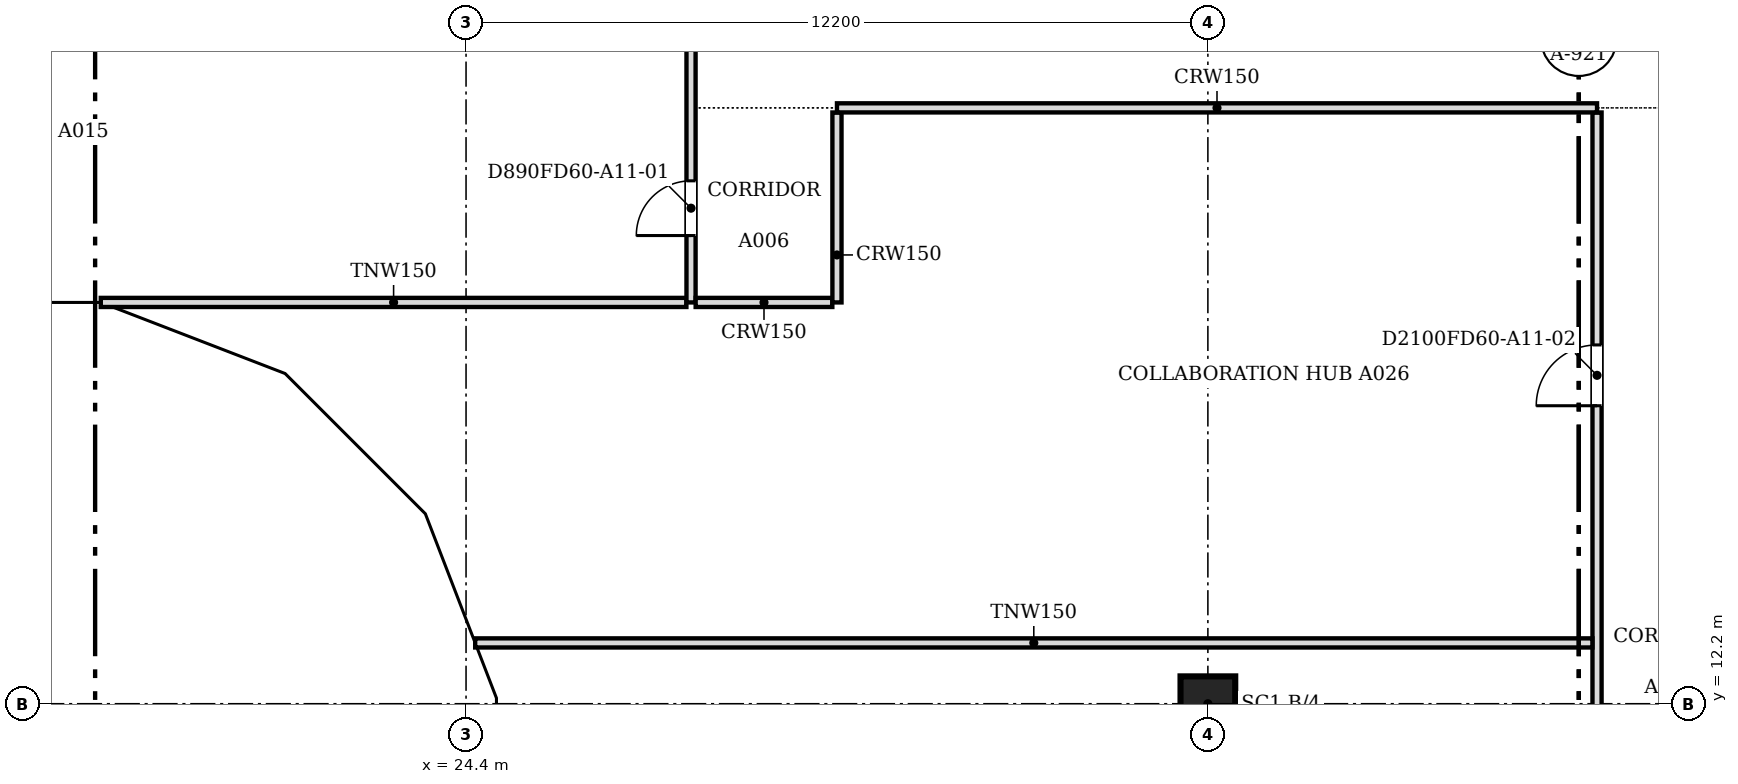
"""IFC4 building model, lengths in metres.
Left out: names, types, materials, properties, quantities, classifications, styles, units other than length and angle.
Written with IfcOpenShell. Run it as: python <this file> out.ifc"""

import sys

from ifc_helpers import new_model, si_unit, direction, frame, frame_2d, origin, origin_2d, place, context, subcontext, project, spatial, polyline, rectangle, outline, extrude, faceted_brep, source, transform, mapped, element, fill, save


model = new_model("IFC4")
c1 = context("Model", 3, precision=1e-05, world=origin(), true_north=direction((0.0, 1.0)))
c2 = subcontext(c1, "Body", "Model", "MODEL_VIEW")
j1 = project(units=[si_unit("LENGTHUNIT", "METRE"), si_unit("PLANEANGLEUNIT", "RADIAN")], contexts=[c1])
p1 = place(None, origin())
s1 = spatial("IfcSite", under=j1, at=p1, CompositionType="ELEMENT")
p2 = place(p1, origin())
s2 = spatial("IfcBuilding", under=s1, at=p2, CompositionType="ELEMENT")
p3 = place(p2, frame((0.0, 0.0, 124.0)))
s3 = spatial("IfcBuildingStorey", under=s2, at=p3, CompositionType="ELEMENT", Elevation=124.0)
p4 = place(p3, frame((36.6, 12.2, 0.0), z_axis=(0.0, 0.0, 1.0), x_axis=(1.0, 0.0, 0.0)))
e1 = element("IfcColumn", 1, at=p4, inside=s3, PredefinedType="COLUMN", context=c2, shape_type="SweptSolid", body=[
    extrude(rectangle(XDim=0.9, YDim=0.9, at=origin_2d()), origin(), (0.0, 0.0, 1.0), 3.6),
])
m1 = source(origin(), c2, "Body", "Brep", [
    faceted_brep([(3.05, -0.25, 0.0), (6.1, -0.25, 3.743), (6.1, -0.25, 3.857), (3.05, -0.25, 7.6), (0.0, -0.25, 3.8), (0.0, 0.25, 3.8), (3.05, 0.25, 7.6), (6.146, 0.25, 3.8), (3.05, 0.25, 0.0), (6.146, -0.0, 3.8)], [[[0, 1, 2, 3, 4]], [[5, 6, 7, 8]], [[8, 7, 9, 1, 0]], [[7, 6, 3, 2, 9]], [[6, 5, 4, 3]], [[5, 8, 0, 4]], [[1, 9, 2]]]),
])
p5 = place(p3, frame((12.2, 18.55, -3.8), z_axis=(0.0, 0.0, 1.0), x_axis=(1.0, 0.0, 0.0)))
e2 = element("IfcWall", 2, at=p5, inside=s3, PredefinedType="SOLIDWALL", context=c2, shape_type="MappedRepresentation", body=[
    mapped(m1, transform((0.0, 0.0, 0.0), scale=1.0)),
])
m2 = source(origin(), c2, "Body", "SweptSolid", [
    extrude(outline(polyline([(3.052, 0.398), (5.824, 3.8), (3.052, 7.202), (0.321, 3.8), (3.052, 0.398)])), frame((0.0, 0.26, 0.0), z_axis=(0.0, -1.0, 0.0), x_axis=(1.0, 0.0, 0.0)), (0.0, 0.0, 1.0), 0.52),
])
p6 = place(p5, origin())
e3 = element("IfcOpeningElement", 3, at=p6, cuts=e2, PredefinedType="OPENING", context=c2, shape_type="MappedRepresentation", body=[
    mapped(m2, transform((0.0, 0.0, 0.0), scale=1.0)),
])
m3 = source(origin(), c2, "Body", "Brep", [
    faceted_brep([(3.096, -0.25, 7.536), (0.047, -0.25, 3.856), (0.047, -0.25, 3.744), (3.096, -0.25, 0.064), (0.0, 0.25, 3.8), (3.149, 0.25, 7.6), (3.202, 0.25, 7.536), (3.202, 0.25, 0.064), (3.149, 0.25, 0.0), (3.149, -0.0, 0.0), (3.149, -0.0, 7.6), (0.0, 0.0, 3.8)], [[[0, 1, 2, 3]], [[4, 5, 6, 7, 8]], [[8, 7, 9]], [[6, 5, 10]], [[5, 4, 11, 1, 0, 10]], [[4, 8, 9, 3, 2, 11]], [[11, 2, 1]], [[3, 9, 7, 6, 10, 0]]]),
])
p7 = place(p3, frame((18.346, 18.55, -3.8), z_axis=(0.0, 0.0, 1.0), x_axis=(0.932985567668, -0.359913782069, 0.0)))
e4 = element("IfcWall", 4, at=p7, inside=s3, PredefinedType="SOLIDWALL", context=c2, shape_type="MappedRepresentation", body=[
    mapped(m3, transform((0.0, 0.0, 0.0), scale=1.0)),
])
m4 = source(origin(), c2, "Body", "SweptSolid", [
    extrude(outline(polyline([(2.949, 6.967), (0.325, 3.8), (2.949, 0.633), (2.949, 6.967)])), frame((0.0, 0.26, 0.0), z_axis=(0.0, -1.0, 0.0), x_axis=(1.0, 0.0, 0.0)), (0.0, 0.0, 1.0), 0.52),
])
p8 = place(p7, origin())
e5 = element("IfcOpeningElement", 5, at=p8, cuts=e4, PredefinedType="OPENING", context=c2, shape_type="MappedRepresentation", body=[
    mapped(m4, transform((0.0, 0.0, 0.0), scale=1.0)),
])
m5 = source(origin(), c2, "Body", "Brep", [
    faceted_brep([(0.106, -0.25, 0.064), (3.156, -0.25, 3.736), (3.156, -0.25, 3.864), (0.106, -0.25, 7.536), (0.0, 0.25, 7.536), (0.053, 0.25, 7.6), (3.209, 0.25, 3.8), (0.053, 0.25, 0.0), (0.0, 0.25, 0.064), (3.209, -0.0, 3.8), (0.053, 0.0, 0.0), (0.053, 0.0, 7.6)], [[[0, 1, 2, 3]], [[4, 5, 6, 7, 8]], [[7, 6, 9, 1, 0, 10]], [[6, 5, 11, 3, 2, 9]], [[5, 4, 11]], [[8, 7, 10]], [[8, 10, 0, 3, 11, 4]], [[1, 9, 2]]]),
])
p9 = place(p3, frame((21.248, 17.454, -3.8), z_axis=(0.0, 0.0, 1.0), x_axis=(0.707106781187, -0.707106781187, 0.0)))
e6 = element("IfcWall", 6, at=p9, inside=s3, PredefinedType="SOLIDWALL", context=c2, shape_type="MappedRepresentation", body=[
    mapped(m5, transform((0.0, 0.0, 0.0), scale=1.0)),
])
m6 = source(origin(), c2, "Body", "SweptSolid", [
    extrude(outline(polyline([(0.253, 0.632), (2.884, 3.8), (0.253, 6.968), (0.253, 0.632)])), frame((0.0, 0.26, 0.0), z_axis=(0.0, -1.0, 0.0), x_axis=(1.0, 0.0, 0.0)), (0.0, 0.0, 1.0), 0.52),
])
p10 = place(p9, origin())
e7 = element("IfcOpeningElement", 7, at=p10, cuts=e6, PredefinedType="OPENING", context=c2, shape_type="MappedRepresentation", body=[
    mapped(m6, transform((0.0, 0.0, 0.0), scale=1.0)),
])
m7 = source(origin(), c2, "Body", "Brep", [
    faceted_brep([(3.103, -0.25, 7.544), (0.053, -0.25, 3.864), (0.053, -0.25, 3.736), (3.103, -0.25, 0.056), (0.0, 0.25, 3.8), (3.149, 0.25, 7.6), (3.196, 0.25, 7.543), (3.196, 0.25, 0.057), (3.149, 0.25, 0.0), (3.149, -0.0, 0.0), (3.149, -0.0, 7.6), (0.0, 0.0, 3.8)], [[[0, 1, 2, 3]], [[4, 5, 6, 7, 8]], [[8, 7, 9]], [[6, 5, 10]], [[5, 4, 11, 1, 0, 10]], [[4, 8, 9, 3, 2, 11]], [[11, 2, 1]], [[3, 9, 7, 6, 10, 0]]]),
])
p11 = place(p3, frame((23.517, 15.185, -3.8), z_axis=(0.0, 0.0, 1.0), x_axis=(0.359864468756, -0.933004589553, 0.0)))
e8 = element("IfcWall", 8, at=p11, inside=s3, PredefinedType="SOLIDWALL", context=c2, shape_type="MappedRepresentation", body=[
    mapped(m7, transform((0.0, 0.0, 0.0), scale=1.0)),
])
p12 = place(p11, origin())
e9 = element("IfcOpeningElement", 9, at=p12, cuts=e8, PredefinedType="OPENING", context=c2, shape_type="MappedRepresentation", body=[
    mapped(m4, transform((0.0, 0.0, 0.0), scale=1.0)),
])
m8 = source(origin(), c2, "Body", "Brep", [
    faceted_brep([(0.093, -0.25, 0.057), (3.143, -0.25, 3.8), (0.093, -0.25, 7.543), (0.0, 0.25, 7.544), (0.047, 0.25, 7.6), (3.143, 0.25, 3.8), (0.047, 0.25, 0.0), (0.0, 0.25, 0.056), (0.047, 0.0, 0.0), (0.047, 0.0, 7.6)], [[[0, 1, 2]], [[3, 4, 5, 6, 7]], [[6, 5, 1, 0, 8]], [[5, 4, 9, 2, 1]], [[4, 3, 9]], [[7, 6, 8]], [[7, 8, 0, 2, 9, 3]]]),
])
p13 = place(p3, frame((24.65, 12.293, -3.8), z_axis=(0.0, 0.0, 1.0), x_axis=(0.0, -1.0, 0.0)))
e10 = element("IfcWall", 10, at=p13, inside=s3, PredefinedType="SOLIDWALL", context=c2, shape_type="MappedRepresentation", body=[
    mapped(m8, transform((0.0, 0.0, 0.0), scale=1.0)),
])
m9 = source(origin(), c2, "Body", "SweptSolid", [
    extrude(outline(polyline([(0.247, 0.641), (2.821, 3.8), (0.247, 6.959), (0.247, 0.641)])), frame((0.0, 0.26, 0.0), z_axis=(0.0, -1.0, 0.0), x_axis=(1.0, 0.0, 0.0)), (0.0, 0.0, 1.0), 0.52),
])
p14 = place(p13, origin())
e11 = element("IfcOpeningElement", 11, at=p14, cuts=e10, PredefinedType="OPENING", context=c2, shape_type="MappedRepresentation", body=[
    mapped(m9, transform((0.0, 0.0, 0.0), scale=1.0)),
])
p15 = place(p2, frame((0.0, 0.0, 127.8)))
s4 = spatial("IfcBuildingStorey", under=s2, at=p15, CompositionType="ELEMENT", Elevation=127.8)
m10 = source(origin(), c2, "Body", "Brep", [
    faceted_brep([(3.05, -0.25, 7.543), (0.0, -0.25, 3.8), (3.05, -0.25, 0.057), (0.0, 0.25, 3.8), (3.096, 0.25, 7.6), (3.143, 0.25, 7.544), (3.143, 0.25, 0.056), (3.096, 0.25, 0.0), (3.096, -0.0, 0.0), (3.096, -0.0, 7.6)], [[[0, 1, 2]], [[3, 4, 5, 6, 7]], [[7, 6, 8]], [[5, 4, 9]], [[4, 3, 1, 0, 9]], [[3, 7, 8, 2, 1]], [[2, 8, 6, 5, 9, 0]]]),
])
p16 = place(p15, frame((15.25, 18.55, -3.8), z_axis=(0.0, 0.0, 1.0), x_axis=(1.0, 0.0, 0.0)))
e12 = element("IfcWall", 12, at=p16, inside=s4, PredefinedType="SOLIDWALL", context=c2, shape_type="MappedRepresentation", body=[
    mapped(m10, transform((0.0, 0.0, 0.0), scale=1.0)),
])
m11 = source(origin(), c2, "Body", "SweptSolid", [
    extrude(outline(polyline([(2.896, 6.959), (0.323, 3.8), (2.896, 0.641), (2.896, 6.959)])), frame((0.0, 0.26, 0.0), z_axis=(0.0, -1.0, 0.0), x_axis=(1.0, 0.0, 0.0)), (0.0, 0.0, 1.0), 0.52),
])
p17 = place(p16, origin())
e13 = element("IfcOpeningElement", 13, at=p17, cuts=e12, PredefinedType="OPENING", context=c2, shape_type="MappedRepresentation", body=[
    mapped(m11, transform((0.0, 0.0, 0.0), scale=1.0)),
])
m12 = source(origin(), c2, "Body", "Brep", [
    faceted_brep([(0.093, -0.25, 0.056), (3.143, -0.25, 3.736), (3.143, -0.25, 3.864), (0.093, -0.25, 7.544), (0.0, 0.25, 7.543), (0.047, 0.25, 7.6), (3.196, 0.25, 3.8), (0.047, 0.25, 0.0), (0.0, 0.25, 0.057), (3.196, -0.0, 3.8), (0.047, 0.0, 0.0), (0.047, 0.0, 7.6)], [[[0, 1, 2, 3]], [[4, 5, 6, 7, 8]], [[7, 6, 9, 1, 0, 10]], [[6, 5, 11, 3, 2, 9]], [[5, 4, 11]], [[8, 7, 10]], [[8, 10, 0, 3, 11, 4]], [[1, 9, 2]]]),
])
p18 = place(p15, frame((18.303, 18.567, -3.8), z_axis=(0.0, 0.0, 1.0), x_axis=(0.932978940178, -0.359930961693, 0.0)))
e14 = element("IfcWall", 14, at=p18, inside=s4, PredefinedType="SOLIDWALL", context=c2, shape_type="MappedRepresentation", body=[
    mapped(m12, transform((0.0, 0.0, 0.0), scale=1.0)),
])
m13 = source(origin(), c2, "Body", "SweptSolid", [
    extrude(outline(polyline([(0.247, 0.633), (2.871, 3.8), (0.247, 6.967), (0.247, 0.633)])), frame((0.0, 0.26, 0.0), z_axis=(0.0, -1.0, 0.0), x_axis=(1.0, 0.0, 0.0)), (0.0, 0.0, 1.0), 0.52),
])
p19 = place(p18, origin())
e15 = element("IfcOpeningElement", 15, at=p19, cuts=e14, PredefinedType="OPENING", context=c2, shape_type="MappedRepresentation", body=[
    mapped(m13, transform((0.0, 0.0, 0.0), scale=1.0)),
])
m14 = source(origin(), c2, "Body", "Brep", [
    faceted_brep([(3.103, -0.25, 7.536), (0.053, -0.25, 3.864), (0.053, -0.25, 3.736), (3.103, -0.25, 0.064), (0.0, 0.25, 3.8), (3.156, 0.25, 7.6), (3.209, 0.25, 7.536), (3.209, 0.25, 0.064), (3.156, 0.25, 0.0), (3.156, -0.0, 0.0), (3.156, -0.0, 7.6), (0.0, 0.0, 3.8)], [[[0, 1, 2, 3]], [[4, 5, 6, 7, 8]], [[8, 7, 9]], [[6, 5, 10]], [[5, 4, 11, 1, 0, 10]], [[4, 8, 9, 3, 2, 11]], [[11, 2, 1]], [[3, 9, 7, 6, 10, 0]]]),
])
p20 = place(p15, frame((21.285, 17.417, -3.8), z_axis=(0.0, 0.0, 1.0), x_axis=(0.707106781187, -0.707106781187, 0.0)))
e16 = element("IfcWall", 16, at=p20, inside=s4, PredefinedType="SOLIDWALL", context=c2, shape_type="MappedRepresentation", body=[
    mapped(m14, transform((0.0, 0.0, 0.0), scale=1.0)),
])
m15 = source(origin(), c2, "Body", "SweptSolid", [
    extrude(outline(polyline([(2.956, 6.968), (0.325, 3.8), (2.956, 0.632), (2.956, 6.968)])), frame((0.0, 0.26, 0.0), z_axis=(0.0, -1.0, 0.0), x_axis=(1.0, 0.0, 0.0)), (0.0, 0.0, 1.0), 0.52),
])
p21 = place(p20, origin())
e17 = element("IfcOpeningElement", 17, at=p21, cuts=e16, PredefinedType="OPENING", context=c2, shape_type="MappedRepresentation", body=[
    mapped(m15, transform((0.0, 0.0, 0.0), scale=1.0)),
])
m16 = source(origin(), c2, "Body", "Brep", [
    faceted_brep([(0.106, -0.25, 0.064), (3.156, -0.25, 3.744), (3.156, -0.25, 3.856), (0.106, -0.25, 7.536), (0.0, 0.25, 7.536), (0.053, 0.25, 7.6), (3.202, 0.25, 3.8), (0.053, 0.25, 0.0), (0.0, 0.25, 0.064), (3.202, -0.0, 3.8), (0.053, 0.0, 0.0), (0.053, 0.0, 7.6)], [[[0, 1, 2, 3]], [[4, 5, 6, 7, 8]], [[7, 6, 9, 1, 0, 10]], [[6, 5, 11, 3, 2, 9]], [[5, 4, 11]], [[8, 7, 10]], [[8, 10, 0, 3, 11, 4]], [[1, 9, 2]]]),
])
p22 = place(p15, frame((23.497, 15.234, -3.8), z_axis=(0.0, 0.0, 1.0), x_axis=(0.359913782069, -0.932985567668, 0.0)))
e18 = element("IfcWall", 18, at=p22, inside=s4, PredefinedType="SOLIDWALL", context=c2, shape_type="MappedRepresentation", body=[
    mapped(m16, transform((0.0, 0.0, 0.0), scale=1.0)),
])
m17 = source(origin(), c2, "Body", "SweptSolid", [
    extrude(outline(polyline([(0.253, 0.633), (2.878, 3.8), (0.253, 6.967), (0.253, 0.633)])), frame((0.0, 0.26, 0.0), z_axis=(0.0, -1.0, 0.0), x_axis=(1.0, 0.0, 0.0)), (0.0, 0.0, 1.0), 0.52),
])
p23 = place(p22, origin())
e19 = element("IfcOpeningElement", 19, at=p23, cuts=e18, PredefinedType="OPENING", context=c2, shape_type="MappedRepresentation", body=[
    mapped(m17, transform((0.0, 0.0, 0.0), scale=1.0)),
])
m18 = source(origin(), c2, "Body", "Brep", [
    faceted_brep([(3.096, -0.25, 0.0), (6.1, -0.25, 3.8), (3.096, -0.25, 7.6), (0.047, -0.25, 3.857), (0.047, -0.25, 3.743), (0.0, 0.25, 3.8), (3.096, 0.25, 7.6), (6.053, 0.25, 3.859), (6.053, 0.25, 3.741), (3.096, 0.25, 0.0), (6.1, -0.0, 3.8), (0.0, 0.0, 3.8)], [[[0, 1, 2, 3, 4]], [[5, 6, 7, 8, 9]], [[9, 8, 10, 1, 0]], [[7, 6, 2, 1, 10]], [[6, 5, 11, 3, 2]], [[5, 9, 0, 4, 11]], [[11, 4, 3]], [[10, 8, 7]]]),
])
p24 = place(p15, frame((24.65, 12.247, -3.8), z_axis=(0.0, 0.0, 1.0), x_axis=(0.0, -1.0, 0.0)))
e20 = element("IfcWall", 20, at=p24, inside=s4, PredefinedType="SOLIDWALL", context=c2, shape_type="MappedRepresentation", body=[
    mapped(m18, transform((0.0, 0.0, 0.0), scale=1.0)),
])
m19 = source(origin(), c2, "Body", "SweptSolid", [
    extrude(outline(polyline([(3.094, 0.399), (5.781, 3.8), (3.094, 7.201), (0.323, 3.8), (3.094, 0.399)])), frame((0.0, 0.26, 0.0), z_axis=(0.0, -1.0, 0.0), x_axis=(1.0, 0.0, 0.0)), (0.0, 0.0, 1.0), 0.52),
])
p25 = place(p24, origin())
e21 = element("IfcOpeningElement", 21, at=p25, cuts=e20, PredefinedType="OPENING", context=c2, shape_type="MappedRepresentation", body=[
    mapped(m19, transform((0.0, 0.0, 0.0), scale=1.0)),
])
p26 = place(p3, frame((43.0, 0.5, 0.0), z_axis=(0.0, 0.0, 1.0), x_axis=(0.0, 1.0, 0.0)))
e22 = element("IfcWall", 22, at=p26, inside=s3, PredefinedType="PARTITIONING", context=c2, shape_type="SweptSolid", body=[
    extrude(rectangle(XDim=21.424, YDim=0.15, at=frame_2d((10.712, 0.0))), origin(), (0.0, 0.0, 1.0), 3.067),
])
m20 = source(origin(), c2, "Body", "SweptSolid", [
    extrude(rectangle(XDim=1.0, YDim=2.1, at=frame_2d((0.5, 1.05))), frame((0.0, 0.085, 0.0), z_axis=(0.0, -1.0, 0.0), x_axis=(1.0, 0.0, 0.0)), (0.0, 0.0, 1.0), 0.17),
])
p27 = place(p26, frame((16.601, 0.0, 0.0)))
e23 = element("IfcOpeningElement", 23, at=p27, cuts=e22, PredefinedType="OPENING", context=c2, shape_type="MappedRepresentation", body=[
    mapped(m20, transform((0.0, 0.0, 0.0), scale=1.0)),
])
p28 = place(p26, frame((7.7, 0.0, 0.0)))
e24 = element("IfcOpeningElement", 24, at=p28, cuts=e22, PredefinedType="OPENING", context=c2, shape_type="MappedRepresentation", body=[
    mapped(m20, transform((0.0, 0.0, 0.0), scale=1.0)),
])
p29 = place(p3, frame((24.55, 13.2, 0.0), z_axis=(0.0, 0.0, 1.0), x_axis=(1.0, 0.0, 0.0)))
e25 = element("IfcWall", 25, at=p29, inside=s3, PredefinedType="PARTITIONING", context=c2, shape_type="SweptSolid", body=[
    extrude(rectangle(XDim=18.374, YDim=0.15, at=frame_2d((9.187, 0.0))), origin(), (0.0, 0.0, 1.0), 3.067),
])
p30 = place(p3, frame((18.393, 18.8, 0.0), z_axis=(0.0, 0.0, 1.0), x_axis=(1.0, 0.0, 0.0)))
e26 = element("IfcWall", 26, at=p30, inside=s3, PredefinedType="PARTITIONING", context=c2, shape_type="SweptSolid", body=[
    extrude(rectangle(XDim=9.631, YDim=0.15, at=frame_2d((4.815, 0.0))), origin(), (0.0, 0.0, 1.0), 3.067),
])
p31 = place(p3, frame((28.1, 18.8, 0.0), z_axis=(0.0, 0.0, 1.0), x_axis=(0.0, 1.0, 0.0)))
e27 = element("IfcWall", 27, at=p31, inside=s3, PredefinedType="PARTITIONING", context=c2, shape_type="SweptSolid", body=[
    extrude(rectangle(XDim=26.5, YDim=0.15, at=frame_2d((13.25, 0.0))), origin(), (0.0, 0.0, 1.0), 3.067),
])
m21 = source(origin(), c2, "Body", "SweptSolid", [
    extrude(rectangle(XDim=0.9, YDim=2.1, at=frame_2d((0.45, 1.05))), frame((0.0, 0.085, 0.0), z_axis=(0.0, -1.0, 0.0), x_axis=(1.0, 0.0, 0.0)), (0.0, 0.0, 1.0), 0.17),
])
p32 = place(p31, frame((1.1, 0.0, 0.0)))
e28 = element("IfcOpeningElement", 28, at=p32, cuts=e27, PredefinedType="OPENING", context=c2, shape_type="MappedRepresentation", body=[
    mapped(m21, transform((0.0, 0.0, 0.0), scale=1.0)),
])
p33 = place(p31, frame((9.7, 0.0, 0.0)))
e29 = element("IfcOpeningElement", 29, at=p33, cuts=e27, PredefinedType="OPENING", context=c2, shape_type="MappedRepresentation", body=[
    mapped(m21, transform((0.0, 0.0, 0.0), scale=1.0)),
])
p34 = place(p31, frame((20.15, 0.0, 0.0)))
e30 = element("IfcOpeningElement", 30, at=p34, cuts=e27, PredefinedType="OPENING", context=c2, shape_type="MappedRepresentation", body=[
    mapped(m21, transform((0.0, 0.0, 0.0), scale=1.0)),
])
p35 = place(p3, frame((28.176, 18.8, 0.0), z_axis=(0.0, 0.0, 1.0), x_axis=(1.0, 0.0, 0.0)))
e31 = element("IfcWall", 31, at=p35, inside=s3, PredefinedType="PARTITIONING", context=c2, shape_type="SweptSolid", body=[
    extrude(rectangle(XDim=2.248, YDim=0.15, at=frame_2d((1.124, 0.0))), origin(), (0.0, 0.0, 1.0), 3.067),
])
p36 = place(p3, frame((30.5, 18.8, 0.0), z_axis=(0.0, 0.0, 1.0), x_axis=(0.0, 1.0, 0.0)))
e32 = element("IfcWall", 32, at=p36, inside=s3, PredefinedType="PARTITIONING", context=c2, shape_type="SweptSolid", body=[
    extrude(rectangle(XDim=3.124, YDim=0.15, at=frame_2d((1.562, 0.0))), origin(), (0.0, 0.0, 1.0), 3.067),
])
p37 = place(p3, frame((30.5, 22.0, 0.0), z_axis=(0.0, 0.0, 1.0), x_axis=(1.0, 0.0, 0.0)))
e33 = element("IfcWall", 33, at=p37, inside=s3, PredefinedType="PARTITIONING", context=c2, shape_type="SweptSolid", body=[
    extrude(rectangle(XDim=12.5, YDim=0.15, at=frame_2d((6.25, 0.0))), origin(), (0.0, 0.0, 1.0), 3.067),
])
m22 = source(origin(), c2, "Body", "SweptSolid", [
    extrude(rectangle(XDim=0.9, YDim=2.1, at=frame_2d((0.45, 1.05))), frame((0.0, 0.025, 0.0), z_axis=(0.0, -1.0, 0.0), x_axis=(1.0, 0.0, 0.0)), (0.0, 0.0, 1.0), 0.05),
])
p38 = place(p32, origin())
e34 = element("IfcDoor", 34, at=p38, inside=s3, OperationType="SINGLE_SWING_LEFT", PredefinedType="DOOR", context=c2, shape_type="MappedRepresentation", body=[
    mapped(m22, transform((0.0, 0.0, 0.0), scale=1.0)),
])
fill(e28, e34)
m23 = source(origin(), c2, "Body", "SweptSolid", [
    extrude(rectangle(XDim=1.0, YDim=2.1, at=frame_2d((0.5, 1.05))), frame((0.0, 0.025, 0.0), z_axis=(0.0, -1.0, 0.0), x_axis=(1.0, 0.0, 0.0)), (0.0, 0.0, 1.0), 0.05),
])
p39 = place(p27, origin())
e35 = element("IfcDoor", 35, at=p39, inside=s3, OperationType="SINGLE_SWING_LEFT", PredefinedType="DOOR", context=c2, shape_type="MappedRepresentation", body=[
    mapped(m23, transform((0.0, 0.0, 0.0), scale=1.0)),
])
fill(e23, e35)
save(model, sys.argv[1])
